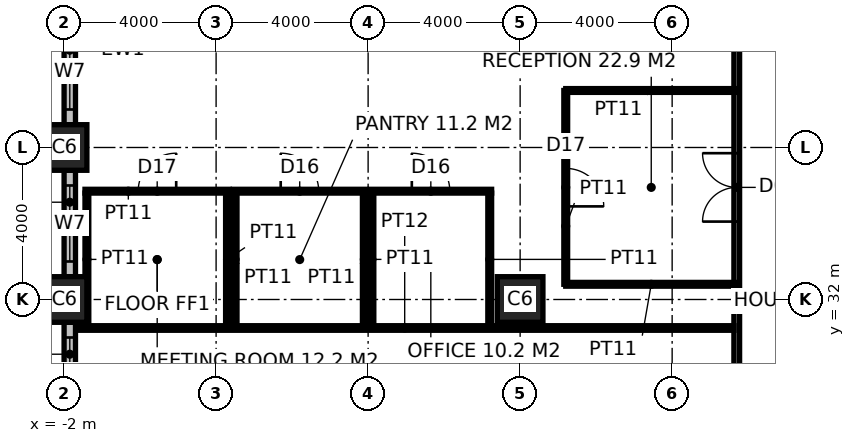
"""IFC4 building model, lengths in metres.
Left out: names, types, materials, properties, quantities, classifications, styles, units other than length and angle.
Written with IfcOpenShell. Run it as: python <this file> out.ifc"""

import sys

from ifc_helpers import new_model, si_unit, direction, frame, frame_2d, origin, origin_2d, place, context, subcontext, project, spatial, rectangle, hollow_rectangle, extrude, element, fill, save


model = new_model("IFC4")
c1 = context("Model", 3, precision=1e-05, world=origin(), true_north=direction((0.0, 1.0)))
c2 = subcontext(c1, "Body", "Model", "MODEL_VIEW")
j1 = project(units=[si_unit("LENGTHUNIT", "METRE"), si_unit("PLANEANGLEUNIT", "RADIAN")], contexts=[c1])
p1 = place(None, origin())
s1 = spatial("IfcSite", under=j1, at=p1, CompositionType="ELEMENT")
p2 = place(p1, origin())
s2 = spatial("IfcBuilding", under=s1, at=p2, CompositionType="ELEMENT")
p3 = place(p2, frame((0.0, 0.0, 67.0)))
s3 = spatial("IfcBuildingStorey", under=s2, at=p3, CompositionType="ELEMENT", Elevation=67.0)
for number, where, z_axis, x_axis in (
    (1, (-2.0, 32.0, 0.0), (0.0, 0.0, 1.0), (1.0, 0.0, 0.0)),
    (2, (-2.0, 36.0, 0.0), (0.0, 0.0, 1.0), (1.0, 0.0, 0.0)),
    (3, (10.0, 32.0, 0.0), (0.0, 0.0, 1.0), (1.0, 0.0, 0.0)),
):
    element("IfcColumn", number, at=place(p3, frame(where, z_axis=z_axis, x_axis=x_axis)), inside=s3, PredefinedType="COLUMN", context=c2, shape_type="SweptSolid", body=[
        extrude(hollow_rectangle(XDim=1.2, YDim=1.2, WallThickness=0.125, at=origin_2d()), origin(), (0.0, 0.0, 1.0), 4.0),
    ])
p4 = place(p3, frame((15.7, 14.625, 0.0), z_axis=(0.0, 0.0, 1.0), x_axis=(0.0, 1.0, 0.0)))
e4 = element("IfcWall", 4, at=p4, inside=s3, PredefinedType="PARTITIONING", context=c2, shape_type="SweptSolid", body=[
    extrude(rectangle(XDim=24.15, YDim=0.15, at=frame_2d((12.075, 0.0))), origin(), (0.0, 0.0, 1.0), 3.85),
])
p5 = place(p4, frame((7.475, 0.0, 0.0)))
e5 = element("IfcOpeningElement", 5, at=p5, cuts=e4, PredefinedType="OPENING", context=c2, shape_type="SweptSolid", body=[
    extrude(rectangle(XDim=1.8, YDim=2.4, at=frame_2d((0.9, 1.2))), frame((0.0, 0.085, 0.0), z_axis=(0.0, -1.0, 0.0), x_axis=(1.0, 0.0, 0.0)), (0.0, 0.0, 1.0), 0.17),
])
p6 = place(p4, frame((19.425, 0.0, 0.0)))
e6 = element("IfcOpeningElement", 6, at=p6, cuts=e4, PredefinedType="OPENING", context=c2, shape_type="SweptSolid", body=[
    extrude(rectangle(XDim=1.8, YDim=2.4, at=frame_2d((0.9, 1.2))), frame((0.0, 0.085, 0.0), z_axis=(0.0, -1.0, 0.0), x_axis=(1.0, 0.0, 0.0)), (0.0, 0.0, 1.0), 0.17),
])
p7 = place(p3, frame((-1.7, 31.25, 0.0), z_axis=(0.0, 0.0, 1.0), x_axis=(1.0, 0.0, 0.0)))
e7 = element("IfcWall", 7, at=p7, inside=s3, PredefinedType="PARTITIONING", context=c2, shape_type="SweptSolid", body=[
    extrude(rectangle(XDim=17.325, YDim=0.12, at=frame_2d((8.663, 0.0))), origin(), (0.0, 0.0, 1.0), 3.85),
])
p8 = place(p3, frame((-1.45, 34.85, 0.0), z_axis=(0.0, 0.0, 1.0), x_axis=(1.0, 0.0, 0.0)))
e8 = element("IfcWall", 8, at=p8, inside=s3, PredefinedType="PARTITIONING", context=c2, shape_type="SweptSolid", body=[
    extrude(rectangle(XDim=3.8, YDim=0.1, at=frame_2d((1.9, 0.0))), origin(), (0.0, 0.0, 1.0), 3.85),
])
p9 = place(p8, frame((1.4, 0.0, 0.0)))
e9 = element("IfcOpeningElement", 9, at=p9, cuts=e8, PredefinedType="OPENING", context=c2, shape_type="SweptSolid", body=[
    extrude(rectangle(XDim=1.0, YDim=2.2, at=frame_2d((0.5, 1.1))), frame((0.0, 0.06, 0.0), z_axis=(0.0, -1.0, 0.0), x_axis=(1.0, 0.0, 0.0)), (0.0, 0.0, 1.0), 0.12),
])
p10 = place(p3, frame((2.45, 34.85, 0.0), z_axis=(0.0, 0.0, 1.0), x_axis=(1.0, 0.0, 0.0)))
e10 = element("IfcWall", 10, at=p10, inside=s3, PredefinedType="PARTITIONING", context=c2, shape_type="SweptSolid", body=[
    extrude(rectangle(XDim=3.5, YDim=0.1, at=frame_2d((1.75, 0.0))), origin(), (0.0, 0.0, 1.0), 3.85),
])
p11 = place(p10, frame((1.25, 0.0, 0.0)))
e11 = element("IfcOpeningElement", 11, at=p11, cuts=e10, PredefinedType="OPENING", context=c2, shape_type="SweptSolid", body=[
    extrude(rectangle(XDim=1.0, YDim=2.2, at=frame_2d((0.5, 1.1))), frame((0.0, 0.06, 0.0), z_axis=(0.0, -1.0, 0.0), x_axis=(1.0, 0.0, 0.0)), (0.0, 0.0, 1.0), 0.12),
])
p12 = place(p3, frame((6.05, 34.85, 0.0), z_axis=(0.0, 0.0, 1.0), x_axis=(1.0, 0.0, 0.0)))
e12 = element("IfcWall", 12, at=p12, inside=s3, PredefinedType="PARTITIONING", context=c2, shape_type="SweptSolid", body=[
    extrude(rectangle(XDim=3.2, YDim=0.1, at=frame_2d((1.6, 0.0))), origin(), (0.0, 0.0, 1.0), 3.85),
])
p13 = place(p12, frame((1.1, 0.0, 0.0)))
e13 = element("IfcOpeningElement", 13, at=p13, cuts=e12, PredefinedType="OPENING", context=c2, shape_type="SweptSolid", body=[
    extrude(rectangle(XDim=1.0, YDim=2.2, at=frame_2d((0.5, 1.1))), frame((0.0, 0.06, 0.0), z_axis=(0.0, -1.0, 0.0), x_axis=(1.0, 0.0, 0.0)), (0.0, 0.0, 1.0), 0.12),
])
p14 = place(p3, frame((-1.4, 31.31, 0.0), z_axis=(0.0, 0.0, 1.0), x_axis=(0.0, 1.0, 0.0)))
e14 = element("IfcWall", 14, at=p14, inside=s3, PredefinedType="PARTITIONING", context=c2, shape_type="SweptSolid", body=[
    extrude(rectangle(XDim=3.49, YDim=0.1, at=frame_2d((1.745, 0.0))), origin(), (0.0, 0.0, 1.0), 2.65),
])
for number, where, z_axis, x_axis in (
    (15, (2.3, 31.31, 0.0), (0.0, 0.0, 1.0), (0.0, 1.0, 0.0)),
    (16, (2.5, 31.31, 0.0), (0.0, 0.0, 1.0), (0.0, 1.0, 0.0)),
    (17, (5.9, 31.31, 0.0), (0.0, 0.0, 1.0), (0.0, 1.0, 0.0)),
    (18, (6.1, 31.31, 0.0), (0.0, 0.0, 1.0), (0.0, 1.0, 0.0)),
    (19, (9.2, 31.31, 0.0), (0.0, 0.0, 1.0), (0.0, 1.0, 0.0)),
):
    element("IfcWall", number, at=place(p3, frame(where, z_axis=z_axis, x_axis=x_axis)), inside=s3, PredefinedType="PARTITIONING", context=c2, shape_type="SweptSolid", body=[
        extrude(rectangle(XDim=3.49, YDim=0.1, at=frame_2d((1.745, 0.0))), origin(), (0.0, 0.0, 1.0), 3.85),
    ])
p15 = place(p3, frame((15.7, 37.5, 0.0), z_axis=(0.0, 0.0, 1.0), x_axis=(-1.0, 0.0, 0.0)))
e20 = element("IfcWall", 20, at=p15, inside=s3, PredefinedType="PARTITIONING", context=c2, shape_type="SweptSolid", body=[
    extrude(rectangle(XDim=4.5, YDim=0.1, at=frame_2d((2.25, 0.0))), origin(), (0.0, 0.0, 1.0), 3.85),
])
p16 = place(p3, frame((11.2, 37.5, 0.0), z_axis=(0.0, 0.0, 1.0), x_axis=(0.0, -1.0, 0.0)))
e21 = element("IfcWall", 21, at=p16, inside=s3, PredefinedType="PARTITIONING", context=c2, shape_type="SweptSolid", body=[
    extrude(rectangle(XDim=5.1, YDim=0.1, at=frame_2d((2.55, 0.0))), origin(), (0.0, 0.0, 1.0), 3.85),
])
p17 = place(p16, frame((2.05, 0.0, 0.0)))
e22 = element("IfcOpeningElement", 22, at=p17, cuts=e21, PredefinedType="OPENING", context=c2, shape_type="SweptSolid", body=[
    extrude(rectangle(XDim=1.0, YDim=2.2, at=frame_2d((0.5, 1.1))), frame((0.0, 0.06, 0.0), z_axis=(0.0, -1.0, 0.0), x_axis=(1.0, 0.0, 0.0)), (0.0, 0.0, 1.0), 0.12),
])
p18 = place(p3, frame((11.2, 32.4, 0.0), z_axis=(0.0, 0.0, 1.0), x_axis=(1.0, 0.0, 0.0)))
e23 = element("IfcWall", 23, at=p18, inside=s3, PredefinedType="PARTITIONING", context=c2, shape_type="SweptSolid", body=[
    extrude(rectangle(XDim=4.5, YDim=0.1, at=frame_2d((2.25, 0.0))), origin(), (0.0, 0.0, 1.0), 2.65),
])
p19 = place(p3, frame((-1.85, 31.4, 0.0), z_axis=(0.0, 0.0, 1.0), x_axis=(0.0, -1.0, 0.0)))
e24 = element("IfcWall", 24, at=p19, inside=s3, PredefinedType="ELEMENTEDWALL", context=c2, shape_type="SweptSolid", body=[
    extrude(rectangle(XDim=2.8, YDim=0.3, at=frame_2d((1.4, 0.0))), origin(), (0.0, 0.0, 1.0), 2.65),
])
p20 = place(p19, frame((0.4, 0.0, 0.8)))
e25 = element("IfcOpeningElement", 25, at=p20, cuts=e24, PredefinedType="OPENING", context=c2, shape_type="SweptSolid", body=[
    extrude(rectangle(XDim=2.0, YDim=1.8, at=frame_2d((1.0, 0.9))), frame((0.0, 0.16, 0.0), z_axis=(0.0, -1.0, 0.0), x_axis=(1.0, 0.0, 0.0)), (0.0, 0.0, 1.0), 0.32),
])
p21 = place(p3, frame((-1.85, 35.4, 0.0), z_axis=(0.0, 0.0, 1.0), x_axis=(0.0, -1.0, 0.0)))
e26 = element("IfcWall", 26, at=p21, inside=s3, PredefinedType="ELEMENTEDWALL", context=c2, shape_type="SweptSolid", body=[
    extrude(rectangle(XDim=2.8, YDim=0.3, at=frame_2d((1.4, 0.0))), origin(), (0.0, 0.0, 1.0), 2.65),
])
p22 = place(p21, frame((0.4, 0.0, 0.8)))
e27 = element("IfcOpeningElement", 27, at=p22, cuts=e26, PredefinedType="OPENING", context=c2, shape_type="SweptSolid", body=[
    extrude(rectangle(XDim=2.0, YDim=1.8, at=frame_2d((1.0, 0.9))), frame((0.0, 0.16, 0.0), z_axis=(0.0, -1.0, 0.0), x_axis=(1.0, 0.0, 0.0)), (0.0, 0.0, 1.0), 0.32),
])
p23 = place(p3, frame((-1.85, 39.4, 0.0), z_axis=(0.0, 0.0, 1.0), x_axis=(0.0, -1.0, 0.0)))
e28 = element("IfcWall", 28, at=p23, inside=s3, PredefinedType="ELEMENTEDWALL", context=c2, shape_type="SweptSolid", body=[
    extrude(rectangle(XDim=2.8, YDim=0.3, at=frame_2d((1.4, 0.0))), origin(), (0.0, 0.0, 1.0), 2.65),
])
p24 = place(p23, frame((0.4, 0.0, 0.8)))
e29 = element("IfcOpeningElement", 29, at=p24, cuts=e28, PredefinedType="OPENING", context=c2, shape_type="SweptSolid", body=[
    extrude(rectangle(XDim=2.0, YDim=1.8, at=frame_2d((1.0, 0.9))), frame((0.0, 0.16, 0.0), z_axis=(0.0, -1.0, 0.0), x_axis=(1.0, 0.0, 0.0)), (0.0, 0.0, 1.0), 0.32),
])
p25 = place(p6, origin())
e30 = element("IfcDoor", 30, at=p25, inside=s3, OperationType="DOUBLE_DOOR_DOUBLE_SWING", PredefinedType="DOOR", context=c2, shape_type="SweptSolid", body=[
    extrude(rectangle(XDim=1.8, YDim=2.4, at=frame_2d((0.9, 1.2))), frame((0.0, 0.025, 0.0), z_axis=(0.0, -1.0, 0.0), x_axis=(1.0, 0.0, 0.0)), (0.0, 0.0, 1.0), 0.05),
])
fill(e6, e30)
p26 = place(p9, origin())
e31 = element("IfcDoor", 31, at=p26, inside=s3, OperationType="SINGLE_SWING_RIGHT", PredefinedType="DOOR", context=c2, shape_type="SweptSolid", body=[
    extrude(rectangle(XDim=1.0, YDim=2.2, at=frame_2d((0.5, 1.1))), frame((0.0, 0.025, 0.0), z_axis=(0.0, -1.0, 0.0), x_axis=(1.0, 0.0, 0.0)), (0.0, 0.0, 1.0), 0.05),
])
fill(e9, e31)
p27 = place(p11, origin())
e32 = element("IfcDoor", 32, at=p27, inside=s3, OperationType="SINGLE_SWING_LEFT", PredefinedType="DOOR", context=c2, shape_type="SweptSolid", body=[
    extrude(rectangle(XDim=1.0, YDim=2.2, at=frame_2d((0.5, 1.1))), frame((0.0, 0.025, 0.0), z_axis=(0.0, -1.0, 0.0), x_axis=(1.0, 0.0, 0.0)), (0.0, 0.0, 1.0), 0.05),
])
fill(e11, e32)
p28 = place(p13, origin())
e33 = element("IfcDoor", 33, at=p28, inside=s3, OperationType="SINGLE_SWING_LEFT", PredefinedType="DOOR", context=c2, shape_type="SweptSolid", body=[
    extrude(rectangle(XDim=1.0, YDim=2.2, at=frame_2d((0.5, 1.1))), frame((0.0, 0.025, 0.0), z_axis=(0.0, -1.0, 0.0), x_axis=(1.0, 0.0, 0.0)), (0.0, 0.0, 1.0), 0.05),
])
fill(e13, e33)
p29 = place(p17, origin())
e34 = element("IfcDoor", 34, at=p29, inside=s3, OperationType="SINGLE_SWING_RIGHT", PredefinedType="DOOR", context=c2, shape_type="SweptSolid", body=[
    extrude(rectangle(XDim=1.0, YDim=2.2, at=frame_2d((0.5, 1.1))), frame((0.0, 0.025, 0.0), z_axis=(0.0, -1.0, 0.0), x_axis=(1.0, 0.0, 0.0)), (0.0, 0.0, 1.0), 0.05),
])
fill(e22, e34)
p30 = place(p20, origin())
e35 = element("IfcWindow", 35, at=p30, inside=s3, PartitioningType="SINGLE_PANEL", PredefinedType="WINDOW", context=c2, shape_type="SweptSolid", body=[
    extrude(rectangle(XDim=2.0, YDim=1.8, at=frame_2d((1.0, 0.9))), frame((0.0, 0.03, 0.0), z_axis=(0.0, -1.0, 0.0), x_axis=(1.0, 0.0, 0.0)), (0.0, 0.0, 1.0), 0.06),
])
fill(e25, e35)
p31 = place(p22, origin())
e36 = element("IfcWindow", 36, at=p31, inside=s3, PartitioningType="SINGLE_PANEL", PredefinedType="WINDOW", context=c2, shape_type="SweptSolid", body=[
    extrude(rectangle(XDim=2.0, YDim=1.8, at=frame_2d((1.0, 0.9))), frame((0.0, 0.03, 0.0), z_axis=(0.0, -1.0, 0.0), x_axis=(1.0, 0.0, 0.0)), (0.0, 0.0, 1.0), 0.06),
])
fill(e27, e36)
p32 = place(p24, origin())
e37 = element("IfcWindow", 37, at=p32, inside=s3, PartitioningType="SINGLE_PANEL", PredefinedType="WINDOW", context=c2, shape_type="SweptSolid", body=[
    extrude(rectangle(XDim=2.0, YDim=1.8, at=frame_2d((1.0, 0.9))), frame((0.0, 0.03, 0.0), z_axis=(0.0, -1.0, 0.0), x_axis=(1.0, 0.0, 0.0)), (0.0, 0.0, 1.0), 0.06),
])
fill(e29, e37)
save(model, sys.argv[1])
